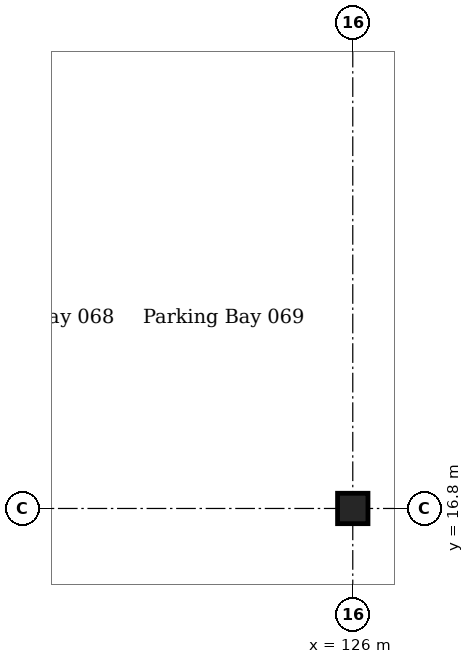
"""IFC4 building model, lengths in metres.
Left out: names, types, materials, properties, quantities, classifications, styles, units other than length and angle.
Written with IfcOpenShell. Run it as: python <this file> out.ifc"""

import sys

from ifc_helpers import new_model, si_unit, direction, frame, origin, origin_2d, place, context, subcontext, project, spatial, i_section, extrude, element, save


model = new_model("IFC4")
c1 = context("Model", 3, precision=1e-05, world=origin(), true_north=direction((0.0, 1.0)))
c2 = subcontext(c1, "Body", "Model", "MODEL_VIEW")
j1 = project(units=[si_unit("LENGTHUNIT", "METRE"), si_unit("PLANEANGLEUNIT", "RADIAN")], contexts=[c1])
p1 = place(None, origin())
s1 = spatial("IfcSite", under=j1, at=p1, CompositionType="ELEMENT")
p2 = place(p1, origin())
s2 = spatial("IfcBuilding", under=s1, at=p2, CompositionType="ELEMENT")
p3 = place(p2, frame((0.0, 0.0, -5.4)))
s3 = spatial("IfcBuildingStorey", under=s2, at=p3, CompositionType="ELEMENT", Elevation=-5.4)
p4 = place(p3, frame((126.0, 16.8, 0.0), z_axis=(0.0, 0.0, 1.0), x_axis=(1.0, 0.0, 0.0)))
e1 = element("IfcColumn", 1, at=p4, inside=s3, PredefinedType="COLUMN", context=c2, shape_type="SweptSolid", body=[
    extrude(i_section(OverallWidth=0.4, OverallDepth=0.4, WebThickness=0.013, FlangeThickness=0.021, FilletRadius=0.022, at=origin_2d()), origin(), (0.0, 0.0, 1.0), 5.4),
])
save(model, sys.argv[1])
